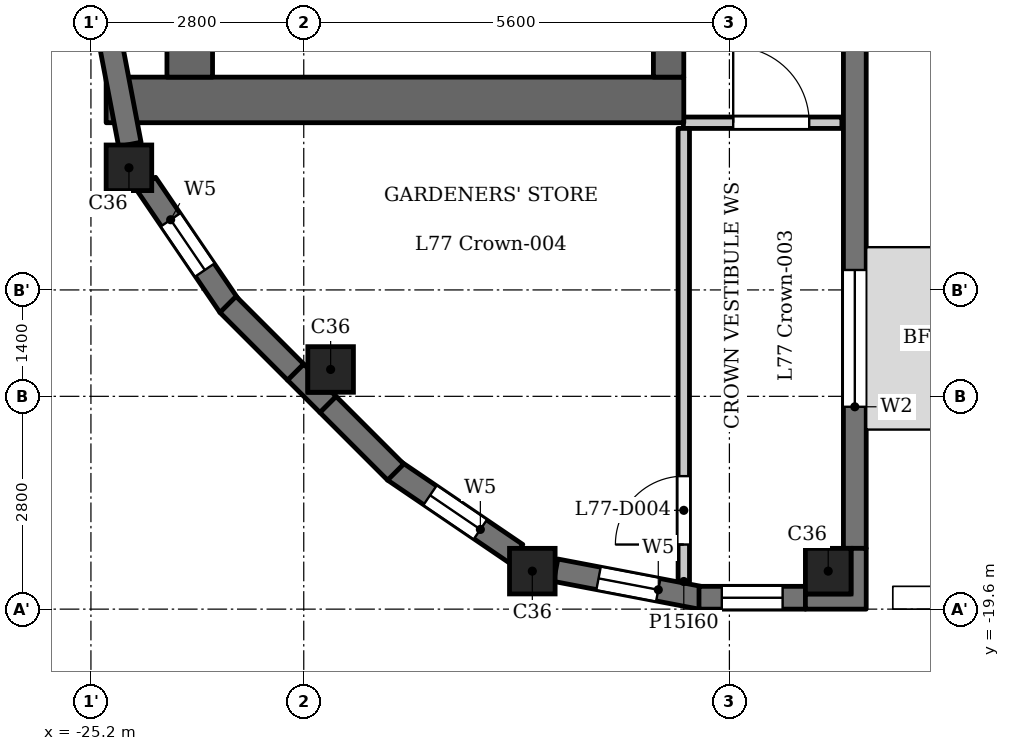
"""IFC4 building model, lengths in metres.
Left out: names, types, materials, properties, quantities, classifications, styles, units other than length and angle.
Written with IfcOpenShell. Run it as: python <this file> out.ifc"""

import sys

from ifc_helpers import new_model, si_unit, direction, frame, frame_2d, origin, origin_2d, place, context, subcontext, project, spatial, polyline, rectangle, outline, extrude, element, fill, save


model = new_model("IFC4")
c1 = context("Model", 3, precision=1e-05, world=origin(), true_north=direction((0.0, 1.0)))
c2 = subcontext(c1, "Body", "Model", "MODEL_VIEW")
j1 = project(units=[si_unit("LENGTHUNIT", "METRE"), si_unit("PLANEANGLEUNIT", "RADIAN")], contexts=[c1])
p1 = place(None, origin())
s1 = spatial("IfcSite", under=j1, at=p1, CompositionType="ELEMENT")
p2 = place(p1, origin())
s2 = spatial("IfcBuilding", under=s1, at=p2, CompositionType="ELEMENT")
p3 = place(p2, frame((0.0, 0.0, 299.9)))
s3 = spatial("IfcBuildingStorey", under=s2, at=p3, CompositionType="ELEMENT", Elevation=299.9)
for number, where, z_axis, x_axis in (
    (1, (-24.7, -13.793, 0.0), (0.0, 0.0, 1.0), (1.0, 0.0, 0.0)),
    (2, (-22.046, -16.446, 0.0), (0.0, 0.0, 1.0), (1.0, 0.0, 0.0)),
    (3, (-19.393, -19.1, 0.0), (0.0, 0.0, 1.0), (1.0, 0.0, 0.0)),
    (4, (-15.5, -19.1, 0.0), (0.0, 0.0, 1.0), (1.0, 0.0, 0.0)),
):
    element("IfcColumn", number, at=place(p3, frame(where, z_axis=z_axis, x_axis=x_axis)), inside=s3, PredefinedType="COLUMN", context=c2, shape_type="SweptSolid", body=[
        extrude(rectangle(XDim=0.6, YDim=0.6, at=origin_2d()), origin(), (0.0, 0.0, 1.0), 3.5),
    ])
p4 = place(p3, frame((-21.213, -17.779, 0.0), z_axis=(0.0, 0.0, 1.0), x_axis=(0.827022075481, -0.562169446579, 0.0)))
e5 = element("IfcWall", 5, at=p4, inside=s3, PredefinedType="SOLIDWALL", context=c2, shape_type="SweptSolid", body=[
    extrude(rectangle(XDim=1.948, YDim=0.3, at=frame_2d((0.974, 0.0))), origin(), (0.0, 0.0, 1.0), 2.6),
])
p5 = place(p4, frame((0.574, 0.0, 0.6)))
e6 = element("IfcOpeningElement", 6, at=p5, cuts=e5, PredefinedType="OPENING", context=c2, shape_type="SweptSolid", body=[
    extrude(rectangle(XDim=0.8, YDim=1.55, at=frame_2d((0.4, 0.775))), frame((0.0, 0.16, 0.0), z_axis=(0.0, -1.0, 0.0), x_axis=(1.0, 0.0, 0.0)), (0.0, 0.0, 1.0), 0.32),
])
p6 = place(p3, frame((-19.085, -19.088, 0.0), z_axis=(0.0, 0.0, 1.0), x_axis=(0.982286967073, -0.187382801553, 0.0)))
e7 = element("IfcWall", 7, at=p6, inside=s3, PredefinedType="SOLIDWALL", context=c2, shape_type="SweptSolid", body=[
    extrude(rectangle(XDim=1.948, YDim=0.3, at=frame_2d((0.974, 0.0))), origin(), (0.0, 0.0, 1.0), 2.6),
])
p7 = place(p6, frame((0.574, 0.0, 0.6)))
e8 = element("IfcOpeningElement", 8, at=p7, cuts=e7, PredefinedType="OPENING", context=c2, shape_type="SweptSolid", body=[
    extrude(rectangle(XDim=0.8, YDim=1.55, at=frame_2d((0.4, 0.775))), frame((0.0, 0.16, 0.0), z_axis=(0.0, -1.0, 0.0), x_axis=(1.0, 0.0, 0.0)), (0.0, 0.0, 1.0), 0.32),
])
p8 = place(p3, frame((-17.2, -19.45, 0.0), z_axis=(0.0, 0.0, 1.0), x_axis=(1.0, 0.0, 0.0)))
e9 = element("IfcWall", 9, at=p8, inside=s3, PredefinedType="SOLIDWALL", context=c2, shape_type="SweptSolid", body=[
    extrude(rectangle(XDim=1.4, YDim=0.3, at=frame_2d((0.7, 0.0))), origin(), (0.0, 0.0, 1.0), 3.2),
])
p9 = place(p8, frame((0.3, 0.0, 0.6)))
e10 = element("IfcOpeningElement", 10, at=p9, cuts=e9, PredefinedType="OPENING", context=c2, shape_type="SweptSolid", body=[
    extrude(rectangle(XDim=0.8, YDim=1.55, at=frame_2d((0.4, 0.775))), frame((0.0, 0.16, 0.0), z_axis=(0.0, -1.0, 0.0), x_axis=(1.0, 0.0, 0.0)), (0.0, 0.0, 1.0), 0.32),
])
p10 = place(p3, frame((-15.15, -18.8, 0.0), z_axis=(0.0, 0.0, 1.0), x_axis=(0.0, 1.0, 0.0)))
e11 = element("IfcWall", 11, at=p10, inside=s3, PredefinedType="SOLIDWALL", context=c2, shape_type="SweptSolid", body=[
    extrude(rectangle(XDim=7.3, YDim=0.3, at=frame_2d((3.65, 0.0))), origin(), (0.0, 0.0, 1.0), 3.2),
])
p11 = place(p10, frame((1.863, 0.0, 0.9)))
e12 = element("IfcOpeningElement", 12, at=p11, cuts=e11, PredefinedType="OPENING", context=c2, shape_type="SweptSolid", body=[
    extrude(rectangle(XDim=1.8, YDim=1.25, at=frame_2d((0.9, 0.625))), frame((0.0, 0.16, 0.0), z_axis=(0.0, -1.0, 0.0), x_axis=(1.0, 0.0, 0.0)), (0.0, 0.0, 1.0), 0.32),
])
p12 = place(p3, frame((-25.052, -11.573, 0.0), z_axis=(0.0, 0.0, 1.0), x_axis=(0.187354129902, -0.982292436095, 0.0)))
e13 = element("IfcWall", 13, at=p12, inside=s3, PredefinedType="SOLIDWALL", context=c2, shape_type="SweptSolid", body=[
    extrude(rectangle(XDim=1.947, YDim=0.3, at=frame_2d((0.973, 0.0))), origin(), (0.0, 0.0, 1.0), 2.6),
])
p13 = place(p3, frame((-24.474, -14.002, 0.0), z_axis=(0.0, 0.0, 1.0), x_axis=(0.562025435703, -0.827119948752, 0.0)))
e14 = element("IfcWall", 14, at=p13, inside=s3, PredefinedType="SOLIDWALL", context=c2, shape_type="SweptSolid", body=[
    extrude(rectangle(XDim=1.948, YDim=0.3, at=frame_2d((0.974, 0.0))), origin(), (0.0, 0.0, 1.0), 2.6),
])
p14 = place(p13, frame((0.574, 0.0, 0.6)))
e15 = element("IfcOpeningElement", 15, at=p14, cuts=e14, PredefinedType="OPENING", context=c2, shape_type="SweptSolid", body=[
    extrude(rectangle(XDim=0.8, YDim=1.55, at=frame_2d((0.4, 0.775))), frame((0.0, 0.16, 0.0), z_axis=(0.0, -1.0, 0.0), x_axis=(1.0, 0.0, 0.0)), (0.0, 0.0, 1.0), 0.32),
])
for number, where, z_axis, x_axis in (
    (16, (-23.397, -15.591, 0.0), (0.0, 0.0, 1.0), (0.707, -0.707, 0.0)),
    (17, (-22.082, -16.906, 0.0), (0.0, 0.0, 1.0), (0.707, -0.707, 0.0)),
):
    element("IfcWall", number, at=place(p3, frame(where, z_axis=z_axis, x_axis=x_axis)), inside=s3, PredefinedType="SOLIDWALL", context=c2, shape_type="SweptSolid", body=[
        extrude(rectangle(XDim=1.26, YDim=0.3, at=frame_2d((0.63, 0.0))), origin(), (0.0, 0.0, 1.0), 3.2),
    ])
p15 = place(p3, origin())
e18 = element("IfcWall", 18, at=p15, inside=s3, PredefinedType="PARAPET", context=c2, shape_type="SweptSolid", body=[
    extrude(outline(polyline([(-14.65, -19.6), (14.65, -19.6), (14.65, -19.3), (-14.65, -19.3), (-14.65, -19.6)])), origin(), (0.0, 0.0, 1.0), 1.1),
])
p16 = place(p3, frame((-17.4, -12.9, 0.0), z_axis=(0.0, 0.0, 1.0), x_axis=(-1.0, 0.0, 0.0)))
e19 = element("IfcWall", 19, at=p16, inside=s3, PredefinedType="SHEAR", context=c2, shape_type="SweptSolid", body=[
    extrude(rectangle(XDim=7.6, YDim=0.6, at=frame_2d((3.8, 0.0))), origin(), (0.0, 0.0, 1.0), 3.2),
])
p17 = place(p3, frame((-17.6, -12.6, 0.0), z_axis=(0.0, 0.0, 1.0), x_axis=(0.0, 1.0, 0.0)))
e20 = element("IfcWall", 20, at=p17, inside=s3, PredefinedType="SHEAR", context=c2, shape_type="SweptSolid", body=[
    extrude(rectangle(XDim=25.2, YDim=0.4, at=frame_2d((12.6, 0.0))), origin(), (0.0, 0.0, 1.0), 3.2),
])
p18 = place(p17, frame((11.2, 0.0, 0.0)))
e21 = element("IfcOpeningElement", 21, at=p18, cuts=e20, PredefinedType="OPENING", context=c2, shape_type="SweptSolid", body=[
    extrude(rectangle(XDim=0.9, YDim=2.1, at=frame_2d((0.45, 1.05))), frame((0.0, 0.21, 0.0), z_axis=(0.0, -1.0, 0.0), x_axis=(1.0, 0.0, 0.0)), (0.0, 0.0, 1.0), 0.42),
])
p19 = place(p17, frame((17.05, 0.0, 0.0)))
e22 = element("IfcOpeningElement", 22, at=p19, cuts=e20, PredefinedType="OPENING", context=c2, shape_type="SweptSolid", body=[
    extrude(rectangle(XDim=0.9, YDim=2.1, at=frame_2d((0.45, 1.05))), frame((0.0, 0.21, 0.0), z_axis=(0.0, -1.0, 0.0), x_axis=(1.0, 0.0, 0.0)), (0.0, 0.0, 1.0), 0.42),
])
p20 = place(p17, frame((23.25, 0.0, 0.0)))
e23 = element("IfcOpeningElement", 23, at=p20, cuts=e20, PredefinedType="OPENING", context=c2, shape_type="SweptSolid", body=[
    extrude(rectangle(XDim=1.1, YDim=2.1, at=frame_2d((0.55, 1.05))), frame((0.0, 0.21, 0.0), z_axis=(0.0, -1.0, 0.0), x_axis=(1.0, 0.0, 0.0)), (0.0, 0.0, 1.0), 0.42),
])
p21 = place(p17, frame((0.85, 0.0, 0.0)))
e24 = element("IfcOpeningElement", 24, at=p21, cuts=e20, PredefinedType="OPENING", context=c2, shape_type="SweptSolid", body=[
    extrude(rectangle(XDim=1.1, YDim=2.1, at=frame_2d((0.55, 1.05))), frame((0.0, 0.21, 0.0), z_axis=(0.0, -1.0, 0.0), x_axis=(1.0, 0.0, 0.0)), (0.0, 0.0, 1.0), 0.42),
])
p22 = place(p17, frame((13.075, 0.0, 0.0)))
e25 = element("IfcOpeningElement", 25, at=p22, cuts=e20, PredefinedType="OPENING", context=c2, shape_type="SweptSolid", body=[
    extrude(rectangle(XDim=1.8, YDim=2.1, at=frame_2d((0.9, 1.05))), frame((0.0, 0.21, 0.0), z_axis=(0.0, -1.0, 0.0), x_axis=(1.0, 0.0, 0.0)), (0.0, 0.0, 1.0), 0.42),
])
p23 = place(p3, frame((-23.9, -12.6, 0.0), z_axis=(0.0, 0.0, 1.0), x_axis=(0.0, 1.0, 0.0)))
e26 = element("IfcWall", 26, at=p23, inside=s3, PredefinedType="SHEAR", context=c2, shape_type="SweptSolid", body=[
    extrude(rectangle(XDim=25.2, YDim=0.6, at=frame_2d((12.6, 0.0))), origin(), (0.0, 0.0, 1.0), 3.2),
])
p24 = place(p3, frame((-17.405, -13.2, 0.0), z_axis=(0.0, 0.0, 1.0), x_axis=(1.0, 0.0, 0.0)))
e27 = element("IfcWall", 27, at=p24, inside=s3, PredefinedType="PARTITIONING", context=c2, shape_type="SweptSolid", body=[
    extrude(rectangle(XDim=2.085, YDim=0.15, at=frame_2d((1.042, 0.0))), origin(), (0.0, 0.0, 1.0), 3.2),
])
p25 = place(p24, frame((0.655, 0.0, 0.0)))
e28 = element("IfcOpeningElement", 28, at=p25, cuts=e27, PredefinedType="OPENING", context=c2, shape_type="SweptSolid", body=[
    extrude(rectangle(XDim=1.0, YDim=2.1, at=frame_2d((0.5, 1.05))), frame((0.0, 0.085, 0.0), z_axis=(0.0, -1.0, 0.0), x_axis=(1.0, 0.0, 0.0)), (0.0, 0.0, 1.0), 0.17),
])
p26 = place(p3, frame((-17.4, -19.236, 0.0), z_axis=(0.0, 0.0, 1.0), x_axis=(0.0, 1.0, 0.0)))
e29 = element("IfcWall", 29, at=p26, inside=s3, PredefinedType="PARTITIONING", context=c2, shape_type="SweptSolid", body=[
    extrude(rectangle(XDim=5.961, YDim=0.15, at=frame_2d((2.981, 0.0))), origin(), (0.0, 0.0, 1.0), 3.2),
])
p27 = place(p26, frame((0.486, 0.0, 0.0)))
e30 = element("IfcOpeningElement", 30, at=p27, cuts=e29, PredefinedType="OPENING", context=c2, shape_type="SweptSolid", body=[
    extrude(rectangle(XDim=0.9, YDim=2.1, at=frame_2d((0.45, 1.05))), frame((0.0, 0.085, 0.0), z_axis=(0.0, -1.0, 0.0), x_axis=(1.0, 0.0, 0.0)), (0.0, 0.0, 1.0), 0.17),
])
e31 = element("IfcWall", 31, at=p15, inside=s3, PredefinedType="SOLIDWALL", context=c2, shape_type="SweptSolid", body=[
    extrude(outline(polyline([(-15.8, -19.6), (-15.0, -19.6), (-15.0, -18.8), (-15.2, -18.8), (-15.2, -19.4), (-15.8, -19.4), (-15.8, -19.6)])), origin(), (0.0, 0.0, 1.0), 3.2),
])
e32 = element("IfcWall", 32, at=p15, inside=s3, PredefinedType="SOLIDWALL", context=c2, shape_type="SweptSolid", body=[
    extrude(outline(polyline([(-22.4, -16.376), (-22.612, -16.588), (-22.188, -17.012), (-21.976, -16.8), (-22.029, -16.746), (-22.346, -16.746), (-22.346, -16.429), (-22.4, -16.376)])), origin(), (0.0, 0.0, 1.0), 3.2),
])
p28 = place(p25, origin())
e33 = element("IfcDoor", 33, at=p28, inside=s3, OperationType="SINGLE_SWING_RIGHT", PredefinedType="DOOR", context=c2, shape_type="SweptSolid", body=[
    extrude(rectangle(XDim=1.0, YDim=2.1, at=frame_2d((0.5, 1.05))), frame((0.0, 0.025, 0.0), z_axis=(0.0, -1.0, 0.0), x_axis=(1.0, 0.0, 0.0)), (0.0, 0.0, 1.0), 0.05),
])
fill(e28, e33)
p29 = place(p27, origin())
e34 = element("IfcDoor", 34, at=p29, inside=s3, OperationType="SINGLE_SWING_RIGHT", PredefinedType="DOOR", context=c2, shape_type="SweptSolid", body=[
    extrude(rectangle(XDim=0.9, YDim=2.1, at=frame_2d((0.45, 1.05))), frame((0.0, 0.025, 0.0), z_axis=(0.0, -1.0, 0.0), x_axis=(1.0, 0.0, 0.0)), (0.0, 0.0, 1.0), 0.05),
])
fill(e30, e34)
p30 = place(p5, origin())
e35 = element("IfcWindow", 35, at=p30, inside=s3, PartitioningType="SINGLE_PANEL", PredefinedType="WINDOW", context=c2, shape_type="SweptSolid", body=[
    extrude(rectangle(XDim=0.8, YDim=1.55, at=frame_2d((0.4, 0.775))), frame((0.0, 0.03, 0.0), z_axis=(0.0, -1.0, 0.0), x_axis=(1.0, 0.0, 0.0)), (0.0, 0.0, 1.0), 0.06),
])
fill(e6, e35)
p31 = place(p7, origin())
e36 = element("IfcWindow", 36, at=p31, inside=s3, PartitioningType="SINGLE_PANEL", PredefinedType="WINDOW", context=c2, shape_type="SweptSolid", body=[
    extrude(rectangle(XDim=0.8, YDim=1.55, at=frame_2d((0.4, 0.775))), frame((0.0, 0.03, 0.0), z_axis=(0.0, -1.0, 0.0), x_axis=(1.0, 0.0, 0.0)), (0.0, 0.0, 1.0), 0.06),
])
fill(e8, e36)
p32 = place(p9, origin())
e37 = element("IfcWindow", 37, at=p32, inside=s3, PartitioningType="SINGLE_PANEL", PredefinedType="WINDOW", context=c2, shape_type="SweptSolid", body=[
    extrude(rectangle(XDim=0.8, YDim=1.55, at=frame_2d((0.4, 0.775))), frame((0.0, 0.03, 0.0), z_axis=(0.0, -1.0, 0.0), x_axis=(1.0, 0.0, 0.0)), (0.0, 0.0, 1.0), 0.06),
])
fill(e10, e37)
p33 = place(p11, origin())
e38 = element("IfcWindow", 38, at=p33, inside=s3, PartitioningType="SINGLE_PANEL", PredefinedType="WINDOW", context=c2, shape_type="SweptSolid", body=[
    extrude(rectangle(XDim=1.8, YDim=1.25, at=frame_2d((0.9, 0.625))), frame((0.0, 0.03, 0.0), z_axis=(0.0, -1.0, 0.0), x_axis=(1.0, 0.0, 0.0)), (0.0, 0.0, 1.0), 0.06),
])
fill(e12, e38)
p34 = place(p14, origin())
e39 = element("IfcWindow", 39, at=p34, inside=s3, PartitioningType="SINGLE_PANEL", PredefinedType="WINDOW", context=c2, shape_type="SweptSolid", body=[
    extrude(rectangle(XDim=0.8, YDim=1.55, at=frame_2d((0.4, 0.775))), frame((0.0, 0.03, 0.0), z_axis=(0.0, -1.0, 0.0), x_axis=(1.0, 0.0, 0.0)), (0.0, 0.0, 1.0), 0.06),
])
fill(e15, e39)
save(model, sys.argv[1])
